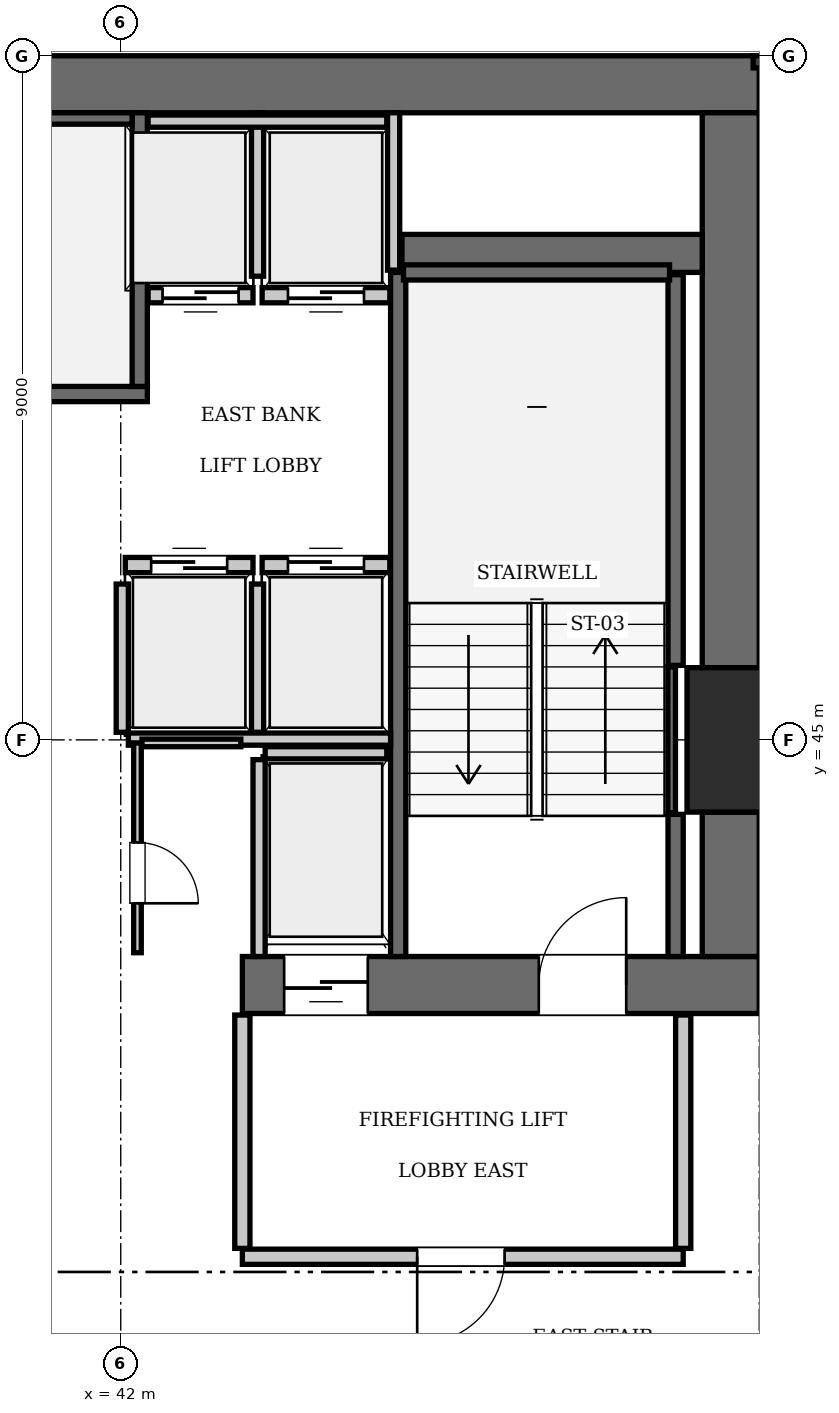
"""IFC4 building model, lengths in metres.
Left out: names, types, materials, properties, quantities, classifications, styles, units other than length and angle.
Written with IfcOpenShell. Run it as: python <this file> out.ifc"""

import sys

from ifc_helpers import new_model, si_unit, direction, frame, frame_2d, origin, origin_2d, place, context, subcontext, project, spatial, rectangle, extrude, element, fill, save


model = new_model("IFC4")
c1 = context("Model", 3, precision=1e-05, world=origin(), true_north=direction((0.0, 1.0)))
c2 = subcontext(c1, "Body", "Model", "MODEL_VIEW")
j1 = project(units=[si_unit("LENGTHUNIT", "METRE"), si_unit("PLANEANGLEUNIT", "RADIAN")], contexts=[c1])
p1 = place(None, origin())
s1 = spatial("IfcSite", under=j1, at=p1, CompositionType="ELEMENT")
p2 = place(p1, origin())
s2 = spatial("IfcBuilding", under=s1, at=p2, CompositionType="ELEMENT")
p3 = place(p2, frame((0.0, 0.0, 131.25)))
s3 = spatial("IfcBuildingStorey", under=s2, at=p3, CompositionType="ELEMENT", Elevation=131.25)
p4 = place(p3, frame((50.4, 45.0, 0.0), z_axis=(0.0, 0.0, 1.0), x_axis=(1.0, 0.0, 0.0)))
e1 = element("IfcColumn", 1, at=p4, inside=s3, PredefinedType="COLUMN", context=c2, shape_type="SweptSolid", body=[
    extrude(rectangle(XDim=1.9, YDim=1.9, at=origin_2d()), origin(), (0.0, 0.0, 1.0), 3.85),
])
p5 = place(p3, frame((25.2, 53.625, 0.0), z_axis=(0.0, 0.0, 1.0), x_axis=(1.0, 0.0, 0.0)))
e2 = element("IfcWall", 2, at=p5, inside=s3, PredefinedType="SHEAR", context=c2, shape_type="SweptSolid", body=[
    extrude(rectangle(XDim=25.2, YDim=0.75, at=frame_2d((12.6, 0.0))), origin(), (0.0, 0.0, 1.0), 3.85),
])
p6 = place(p3, frame((43.6, 41.775, 0.0), z_axis=(0.0, 0.0, 1.0), x_axis=(1.0, 0.0, 0.0)))
e3 = element("IfcWall", 3, at=p6, inside=s3, PredefinedType="SHEAR", context=c2, shape_type="SweptSolid", body=[
    extrude(rectangle(XDim=6.8, YDim=0.75, at=frame_2d((3.4, 0.0))), origin(), (0.0, 0.0, 1.0), 3.85),
])
p7 = place(p6, frame((3.9, 0.0, 0.0)))
e4 = element("IfcOpeningElement", 4, at=p7, cuts=e3, PredefinedType="OPENING", context=c2, shape_type="SweptSolid", body=[
    extrude(rectangle(XDim=1.15, YDim=2.15, at=frame_2d((0.575, 1.075))), frame((0.0, 0.385, 0.0), z_axis=(0.0, -1.0, 0.0), x_axis=(1.0, 0.0, 0.0)), (0.0, 0.0, 1.0), 0.77),
])
p8 = place(p6, frame((0.55, 0.0, 0.0)))
e5 = element("IfcOpeningElement", 5, at=p8, cuts=e3, PredefinedType="OPENING", context=c2, shape_type="SweptSolid", body=[
    extrude(rectangle(XDim=1.1, YDim=2.2, at=frame_2d((0.55, 1.1))), frame((0.0, 0.385, 0.0), z_axis=(0.0, -1.0, 0.0), x_axis=(1.0, 0.0, 0.0)), (0.0, 0.0, 1.0), 0.77),
])
p9 = place(p3, frame((50.025, 42.15, 0.0), z_axis=(0.0, 0.0, 1.0), x_axis=(0.0, 1.0, 0.0)))
e6 = element("IfcWall", 6, at=p9, inside=s3, PredefinedType="SHEAR", context=c2, shape_type="SweptSolid", body=[
    extrude(rectangle(XDim=1.9, YDim=0.75, at=frame_2d((0.95, 0.0))), origin(), (0.0, 0.0, 1.0), 3.85),
])
p10 = place(p3, frame((50.025, 45.95, 0.0), z_axis=(0.0, 0.0, 1.0), x_axis=(0.0, 1.0, 0.0)))
e7 = element("IfcWall", 7, at=p10, inside=s3, PredefinedType="SHEAR", context=c2, shape_type="SweptSolid", body=[
    extrude(rectangle(XDim=7.3, YDim=0.75, at=frame_2d((3.65, 0.0))), origin(), (0.0, 0.0, 1.0), 3.85),
])
p11 = place(p3, frame((45.7, 51.4, 0.0), z_axis=(0.0, 0.0, 1.0), x_axis=(1.0, 0.0, 0.0)))
e8 = element("IfcWall", 8, at=p11, inside=s3, PredefinedType="SHEAR", context=c2, shape_type="SweptSolid", body=[
    extrude(rectangle(XDim=3.95, YDim=0.5, at=frame_2d((1.975, 0.0))), origin(), (0.0, 0.0, 1.0), 3.85),
])
p12 = place(p3, frame((33.25, 49.55, 0.0), z_axis=(0.0, 0.0, 1.0), x_axis=(1.0, 0.0, 0.0)))
e9 = element("IfcWall", 9, at=p12, inside=s3, PredefinedType="SOLIDWALL", context=c2, shape_type="SweptSolid", body=[
    extrude(rectangle(XDim=9.1, YDim=0.2, at=frame_2d((4.55, 0.0))), origin(), (0.0, 0.0, 1.0), 3.61),
])
p13 = place(p3, frame((42.25, 49.65, 0.0), z_axis=(0.0, 0.0, 1.0), x_axis=(0.0, 1.0, 0.0)))
e10 = element("IfcWall", 10, at=p13, inside=s3, PredefinedType="SOLIDWALL", context=c2, shape_type="SweptSolid", body=[
    extrude(rectangle(XDim=3.6, YDim=0.2, at=frame_2d((1.8, 0.0))), origin(), (0.0, 0.0, 1.0), 3.61),
])
p14 = place(p3, frame((33.45, 53.175, 0.0), z_axis=(0.0, 0.0, 1.0), x_axis=(1.0, 0.0, 0.0)))
e11 = element("IfcWall", 11, at=p14, inside=s3, PredefinedType="SOLIDWALL", context=c2, shape_type="SweptSolid", body=[
    extrude(rectangle(XDim=8.7, YDim=0.15, at=frame_2d((4.35, 0.0))), origin(), (0.0, 0.0, 1.0), 3.61),
])
p15 = place(p3, frame((45.65, 42.15, 0.0), z_axis=(0.0, 0.0, 1.0), x_axis=(0.0, 1.0, 0.0)))
e12 = element("IfcWall", 12, at=p15, inside=s3, PredefinedType="SOLIDWALL", context=c2, shape_type="SweptSolid", body=[
    extrude(rectangle(XDim=9.0, YDim=0.2, at=frame_2d((4.5, 0.0))), origin(), (0.0, 0.0, 1.0), 3.61),
])
p16 = place(p3, frame((49.3, 42.15, 0.0), z_axis=(0.0, 0.0, 1.0), x_axis=(0.0, 1.0, 0.0)))
e13 = element("IfcWall", 13, at=p16, inside=s3, PredefinedType="SOLIDWALL", context=c2, shape_type="SweptSolid", body=[
    extrude(rectangle(XDim=1.87, YDim=0.2, at=frame_2d((0.935, 0.0))), origin(), (0.0, 0.0, 1.0), 3.61),
])
p17 = place(p3, frame((49.3, 45.98, 0.0), z_axis=(0.0, 0.0, 1.0), x_axis=(0.0, 1.0, 0.0)))
e14 = element("IfcWall", 14, at=p17, inside=s3, PredefinedType="SOLIDWALL", context=c2, shape_type="SweptSolid", body=[
    extrude(rectangle(XDim=5.14, YDim=0.2, at=frame_2d((2.57, 0.0))), origin(), (0.0, 0.0, 1.0), 3.61),
])
p18 = place(p3, frame((45.72, 51.15, 0.0), z_axis=(0.0, 0.0, 1.0), x_axis=(1.0, 0.0, 0.0)))
e15 = element("IfcWall", 15, at=p18, inside=s3, PredefinedType="SOLIDWALL", context=c2, shape_type="SweptSolid", body=[
    extrude(rectangle(XDim=3.5, YDim=0.2, at=frame_2d((1.75, 0.0))), origin(), (0.0, 0.0, 1.0), 3.61),
])
p19 = place(p3, frame((49.248, 44.04, 0.0), z_axis=(0.0, 0.0, 1.0), x_axis=(0.0, 1.0, 0.0)))
e16 = element("IfcWall", 16, at=p19, inside=s3, PredefinedType="SOLIDWALL", context=c2, shape_type="SweptSolid", body=[
    extrude(rectangle(XDim=1.92, YDim=0.1, at=frame_2d((0.96, 0.0))), origin(), (0.0, 0.0, 1.0), 3.61),
])
p20 = place(p3, frame((42.06, 47.3, 0.0), z_axis=(0.0, 0.0, 1.0), x_axis=(1.0, 0.0, 0.0)))
e17 = element("IfcWall", 17, at=p20, inside=s3, PredefinedType="SOLIDWALL", context=c2, shape_type="SweptSolid", body=[
    extrude(rectangle(XDim=1.68, YDim=0.2, at=frame_2d((0.84, 0.0))), origin(), (0.0, 0.0, 1.0), 3.61),
])
p21 = place(p20, frame((0.34, 0.0, 0.0)))
e18 = element("IfcOpeningElement", 18, at=p21, cuts=e17, PredefinedType="OPENING", context=c2, shape_type="SweptSolid", body=[
    extrude(rectangle(XDim=1.0, YDim=2.15, at=frame_2d((0.5, 1.075))), frame((0.0, 0.11, 0.0), z_axis=(0.0, -1.0, 0.0), x_axis=(1.0, 0.0, 0.0)), (0.0, 0.0, 1.0), 0.22),
])
p22 = place(p3, frame((43.86, 47.3, 0.0), z_axis=(0.0, 0.0, 1.0), x_axis=(1.0, 0.0, 0.0)))
e19 = element("IfcWall", 19, at=p22, inside=s3, PredefinedType="SOLIDWALL", context=c2, shape_type="SweptSolid", body=[
    extrude(rectangle(XDim=1.68, YDim=0.2, at=frame_2d((0.84, 0.0))), origin(), (0.0, 0.0, 1.0), 3.61),
])
p23 = place(p22, frame((0.34, 0.0, 0.0)))
e20 = element("IfcOpeningElement", 20, at=p23, cuts=e19, PredefinedType="OPENING", context=c2, shape_type="SweptSolid", body=[
    extrude(rectangle(XDim=1.0, YDim=2.15, at=frame_2d((0.5, 1.075))), frame((0.0, 0.11, 0.0), z_axis=(0.0, -1.0, 0.0), x_axis=(1.0, 0.0, 0.0)), (0.0, 0.0, 1.0), 0.22),
])
p24 = place(p3, frame((42.36, 50.85, 0.0), z_axis=(0.0, 0.0, 1.0), x_axis=(1.0, 0.0, 0.0)))
e21 = element("IfcWall", 21, at=p24, inside=s3, PredefinedType="SOLIDWALL", context=c2, shape_type="SweptSolid", body=[
    extrude(rectangle(XDim=1.38, YDim=0.2, at=frame_2d((0.69, 0.0))), origin(), (0.0, 0.0, 1.0), 3.61),
])
p25 = place(p24, frame((0.19, 0.0, 0.0)))
e22 = element("IfcOpeningElement", 22, at=p25, cuts=e21, PredefinedType="OPENING", context=c2, shape_type="SweptSolid", body=[
    extrude(rectangle(XDim=1.0, YDim=2.15, at=frame_2d((0.5, 1.075))), frame((0.0, 0.11, 0.0), z_axis=(0.0, -1.0, 0.0), x_axis=(1.0, 0.0, 0.0)), (0.0, 0.0, 1.0), 0.22),
])
p26 = place(p3, frame((43.86, 50.85, 0.0), z_axis=(0.0, 0.0, 1.0), x_axis=(1.0, 0.0, 0.0)))
e23 = element("IfcWall", 23, at=p26, inside=s3, PredefinedType="SOLIDWALL", context=c2, shape_type="SweptSolid", body=[
    extrude(rectangle(XDim=1.68, YDim=0.2, at=frame_2d((0.84, 0.0))), origin(), (0.0, 0.0, 1.0), 3.61),
])
p27 = place(p26, frame((0.34, 0.0, 0.0)))
e24 = element("IfcOpeningElement", 24, at=p27, cuts=e23, PredefinedType="OPENING", context=c2, shape_type="SweptSolid", body=[
    extrude(rectangle(XDim=1.0, YDim=2.15, at=frame_2d((0.5, 1.075))), frame((0.0, 0.11, 0.0), z_axis=(0.0, -1.0, 0.0), x_axis=(1.0, 0.0, 0.0)), (0.0, 0.0, 1.0), 0.22),
])
p28 = place(p3, frame((43.9, 44.83, 0.0), z_axis=(0.0, 0.0, 1.0), x_axis=(1.0, 0.0, 0.0)))
e25 = element("IfcWall", 25, at=p28, inside=s3, PredefinedType="SOLIDWALL", context=c2, shape_type="SweptSolid", body=[
    extrude(rectangle(XDim=1.6, YDim=0.16, at=frame_2d((0.8, 0.0))), origin(), (0.0, 0.0, 1.0), 3.61),
])
p29 = place(p3, frame((43.82, 42.15, 0.0), z_axis=(0.0, 0.0, 1.0), x_axis=(0.0, 1.0, 0.0)))
e26 = element("IfcWall", 26, at=p29, inside=s3, PredefinedType="SOLIDWALL", context=c2, shape_type="SweptSolid", body=[
    extrude(rectangle(XDim=2.59, YDim=0.16, at=frame_2d((1.295, 0.0))), origin(), (0.0, 0.0, 1.0), 3.61),
])
for number, where, z_axis, x_axis in (
    (27, (42.02, 45.1, 0.0), (0.0, 0.0, 1.0), (0.0, 1.0, 0.0)),
    (28, (43.8, 45.1, 0.0), (0.0, 0.0, 1.0), (0.0, 1.0, 0.0)),
):
    element("IfcWall", number, at=place(p3, frame(where, z_axis=z_axis, x_axis=x_axis)), inside=s3, PredefinedType="SOLIDWALL", context=c2, shape_type="SweptSolid", body=[
        extrude(rectangle(XDim=1.95, YDim=0.16, at=frame_2d((0.975, 0.0))), origin(), (0.0, 0.0, 1.0), 3.61),
    ])
p30 = place(p3, frame((42.1, 45.01, 0.0), z_axis=(0.0, 0.0, 1.0), x_axis=(1.0, 0.0, 0.0)))
e29 = element("IfcWall", 29, at=p30, inside=s3, PredefinedType="SOLIDWALL", context=c2, shape_type="SweptSolid", body=[
    extrude(rectangle(XDim=3.45, YDim=0.16, at=frame_2d((1.725, 0.0))), origin(), (0.0, 0.0, 1.0), 3.61),
])
p31 = place(p3, frame((45.59, 51.18, 0.0), z_axis=(0.0, 0.0, 1.0), x_axis=(0.0, 1.0, 0.0)))
e30 = element("IfcWall", 30, at=p31, inside=s3, PredefinedType="SOLIDWALL", context=c2, shape_type="SweptSolid", body=[
    extrude(rectangle(XDim=2.07, YDim=0.16, at=frame_2d((1.035, 0.0))), origin(), (0.0, 0.0, 1.0), 3.61),
])
p32 = place(p3, frame((43.8, 51.1, 0.0), z_axis=(0.0, 0.0, 1.0), x_axis=(0.0, 1.0, 0.0)))
e31 = element("IfcWall", 31, at=p32, inside=s3, PredefinedType="SOLIDWALL", context=c2, shape_type="SweptSolid", body=[
    extrude(rectangle(XDim=2.15, YDim=0.16, at=frame_2d((1.075, 0.0))), origin(), (0.0, 0.0, 1.0), 3.61),
])
p33 = place(p3, frame((42.36, 53.14, 0.0), z_axis=(0.0, 0.0, 1.0), x_axis=(1.0, 0.0, 0.0)))
e32 = element("IfcWall", 32, at=p33, inside=s3, PredefinedType="SOLIDWALL", context=c2, shape_type="SweptSolid", body=[
    extrude(rectangle(XDim=3.14, YDim=0.16, at=frame_2d((1.57, 0.0))), origin(), (0.0, 0.0, 1.0), 3.61),
])
p34 = place(p3, frame((43.6, 38.2, 0.0), z_axis=(0.0, 0.0, 1.0), x_axis=(1.0, 0.0, 0.0)))
e33 = element("IfcWall", 33, at=p34, inside=s3, PredefinedType="PARTITIONING", context=c2, shape_type="SweptSolid", body=[
    extrude(rectangle(XDim=5.8, YDim=0.2, at=frame_2d((2.9, 0.0))), origin(), (0.0, 0.0, 1.0), 3.61),
])
p35 = place(p34, frame((2.3, 0.0, 0.0)))
e34 = element("IfcOpeningElement", 34, at=p35, cuts=e33, PredefinedType="OPENING", context=c2, shape_type="SweptSolid", body=[
    extrude(rectangle(XDim=1.15, YDim=2.15, at=frame_2d((0.575, 1.075))), frame((0.0, 0.11, 0.0), z_axis=(0.0, -1.0, 0.0), x_axis=(1.0, 0.0, 0.0)), (0.0, 0.0, 1.0), 0.22),
])
for number, where, z_axis, x_axis in (
    (35, (43.6, 38.31, 0.0), (0.0, 0.0, 1.0), (0.0, 1.0, 0.0)),
    (36, (49.4, 38.31, 0.0), (0.0, 0.0, 1.0), (0.0, 1.0, 0.0)),
):
    element("IfcWall", number, at=place(p3, frame(where, z_axis=z_axis, x_axis=x_axis)), inside=s3, PredefinedType="PARTITIONING", context=c2, shape_type="SweptSolid", body=[
        extrude(rectangle(XDim=3.07, YDim=0.2, at=frame_2d((1.535, 0.0))), origin(), (0.0, 0.0, 1.0), 3.61),
    ])
p36 = place(p3, frame((42.22, 42.2, 0.0), z_axis=(0.0, 0.0, 1.0), x_axis=(0.0, 1.0, 0.0)))
e37 = element("IfcWall", 37, at=p36, inside=s3, PredefinedType="PARTITIONING", context=c2, shape_type="SweptSolid", body=[
    extrude(rectangle(XDim=2.76, YDim=0.1, at=frame_2d((1.38, 0.0))), origin(), (0.0, 0.0, 1.0), 3.61),
])
p37 = place(p36, frame((0.65, 0.0, 0.0)))
e38 = element("IfcOpeningElement", 38, at=p37, cuts=e37, PredefinedType="OPENING", context=c2, shape_type="SweptSolid", body=[
    extrude(rectangle(XDim=0.8, YDim=2.05, at=frame_2d((0.4, 1.025))), frame((0.0, 0.06, 0.0), z_axis=(0.0, -1.0, 0.0), x_axis=(1.0, 0.0, 0.0)), (0.0, 0.0, 1.0), 0.12),
])
p38 = place(p3, frame((42.28, 44.96, 0.0), z_axis=(0.0, 0.0, 1.0), x_axis=(1.0, 0.0, 0.0)))
e39 = element("IfcWall", 39, at=p38, inside=s3, PredefinedType="PARTITIONING", context=c2, shape_type="SweptSolid", body=[
    extrude(rectangle(XDim=1.3, YDim=0.1, at=frame_2d((0.65, 0.0))), origin(), (0.0, 0.0, 1.0), 3.61),
])
p39 = place(p7, origin())
e40 = element("IfcDoor", 40, at=p39, inside=s3, OperationType="SINGLE_SWING_RIGHT", PredefinedType="DOOR", context=c2, shape_type="SweptSolid", body=[
    extrude(rectangle(XDim=1.15, YDim=2.15, at=frame_2d((0.575, 1.075))), frame((0.0, 0.025, 0.0), z_axis=(0.0, -1.0, 0.0), x_axis=(1.0, 0.0, 0.0)), (0.0, 0.0, 1.0), 0.05),
])
fill(e4, e40)
p40 = place(p21, origin())
e41 = element("IfcDoor", 41, at=p40, inside=s3, OperationType="SLIDING_TO_LEFT", PredefinedType="DOOR", context=c2, shape_type="SweptSolid", body=[
    extrude(rectangle(XDim=1.0, YDim=2.15, at=frame_2d((0.5, 1.075))), frame((0.0, 0.025, 0.0), z_axis=(0.0, -1.0, 0.0), x_axis=(1.0, 0.0, 0.0)), (0.0, 0.0, 1.0), 0.05),
])
fill(e18, e41)
p41 = place(p23, origin())
e42 = element("IfcDoor", 42, at=p41, inside=s3, OperationType="SLIDING_TO_LEFT", PredefinedType="DOOR", context=c2, shape_type="SweptSolid", body=[
    extrude(rectangle(XDim=1.0, YDim=2.15, at=frame_2d((0.5, 1.075))), frame((0.0, 0.025, 0.0), z_axis=(0.0, -1.0, 0.0), x_axis=(1.0, 0.0, 0.0)), (0.0, 0.0, 1.0), 0.05),
])
fill(e20, e42)
p42 = place(p25, frame((1.0, 0.0, 0.0), z_axis=(0.0, 0.0, 1.0), x_axis=(-1.0, 0.0, 0.0)))
e43 = element("IfcDoor", 43, at=p42, inside=s3, OperationType="SLIDING_TO_LEFT", PredefinedType="DOOR", context=c2, shape_type="SweptSolid", body=[
    extrude(rectangle(XDim=1.0, YDim=2.15, at=frame_2d((0.5, 1.075))), frame((0.0, 0.025, 0.0), z_axis=(0.0, -1.0, 0.0), x_axis=(1.0, 0.0, 0.0)), (0.0, 0.0, 1.0), 0.05),
])
fill(e22, e43)
p43 = place(p27, frame((1.0, 0.0, 0.0), z_axis=(0.0, 0.0, 1.0), x_axis=(-1.0, 0.0, 0.0)))
e44 = element("IfcDoor", 44, at=p43, inside=s3, OperationType="SLIDING_TO_LEFT", PredefinedType="DOOR", context=c2, shape_type="SweptSolid", body=[
    extrude(rectangle(XDim=1.0, YDim=2.15, at=frame_2d((0.5, 1.075))), frame((0.0, 0.025, 0.0), z_axis=(0.0, -1.0, 0.0), x_axis=(1.0, 0.0, 0.0)), (0.0, 0.0, 1.0), 0.05),
])
fill(e24, e44)
p44 = place(p8, frame((1.1, 0.0, 0.0), z_axis=(0.0, 0.0, 1.0), x_axis=(-1.0, 0.0, 0.0)))
e45 = element("IfcDoor", 45, at=p44, inside=s3, OperationType="SLIDING_TO_LEFT", PredefinedType="DOOR", context=c2, shape_type="SweptSolid", body=[
    extrude(rectangle(XDim=1.1, YDim=2.2, at=frame_2d((0.55, 1.1))), frame((0.0, 0.025, 0.0), z_axis=(0.0, -1.0, 0.0), x_axis=(1.0, 0.0, 0.0)), (0.0, 0.0, 1.0), 0.05),
])
fill(e5, e45)
p45 = place(p35, frame((1.15, 0.0, 0.0), z_axis=(0.0, 0.0, 1.0), x_axis=(-1.0, 0.0, 0.0)))
e46 = element("IfcDoor", 46, at=p45, inside=s3, OperationType="SINGLE_SWING_RIGHT", PredefinedType="DOOR", context=c2, shape_type="SweptSolid", body=[
    extrude(rectangle(XDim=1.15, YDim=2.15, at=frame_2d((0.575, 1.075))), frame((0.0, 0.025, 0.0), z_axis=(0.0, -1.0, 0.0), x_axis=(1.0, 0.0, 0.0)), (0.0, 0.0, 1.0), 0.05),
])
fill(e34, e46)
p46 = place(p37, frame((0.8, 0.0, 0.0), z_axis=(0.0, 0.0, 1.0), x_axis=(-1.0, 0.0, 0.0)))
e47 = element("IfcDoor", 47, at=p46, inside=s3, OperationType="SINGLE_SWING_RIGHT", PredefinedType="DOOR", context=c2, shape_type="SweptSolid", body=[
    extrude(rectangle(XDim=0.8, YDim=2.05, at=frame_2d((0.4, 1.025))), frame((0.0, 0.025, 0.0), z_axis=(0.0, -1.0, 0.0), x_axis=(1.0, 0.0, 0.0)), (0.0, 0.0, 1.0), 0.05),
])
fill(e38, e47)
save(model, sys.argv[1])
